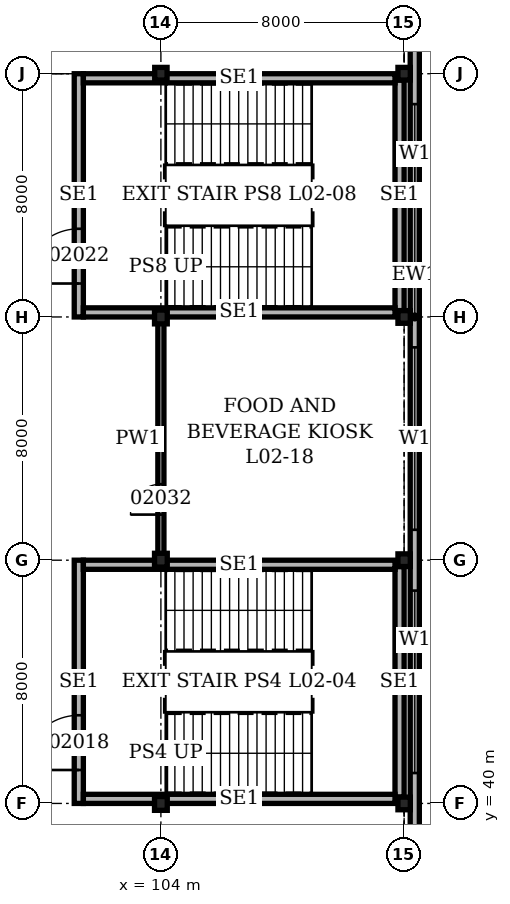
"""IFC4 building model, lengths in metres.
Left out: names, types, materials, properties, quantities, classifications, styles, units other than length and angle.
Written with IfcOpenShell. Run it as: python <this file> out.ifc"""

import sys

from ifc_helpers import new_model, si_unit, direction, frame, frame_2d, origin, origin_2d, place, context, subcontext, project, spatial, rectangle, i_section, extrude, element, fill, save


model = new_model("IFC4")
c1 = context("Model", 3, precision=1e-05, world=origin(), true_north=direction((0.0, 1.0)))
c2 = subcontext(c1, "Body", "Model", "MODEL_VIEW")
j1 = project(units=[si_unit("LENGTHUNIT", "METRE"), si_unit("PLANEANGLEUNIT", "RADIAN")], contexts=[c1])
p1 = place(None, origin())
s1 = spatial("IfcSite", under=j1, at=p1, CompositionType="ELEMENT")
p2 = place(p1, origin())
s2 = spatial("IfcBuilding", under=s1, at=p2, CompositionType="ELEMENT")
p3 = place(p2, frame((0.0, 0.0, 9.9)))
s3 = spatial("IfcBuildingStorey", under=s2, at=p3, CompositionType="ELEMENT", Elevation=9.9)
for number, where, z_axis, x_axis in (
    (1, (104.0, 40.0, 0.0), (0.0, 0.0, 1.0), (1.0, 0.0, 0.0)),
    (2, (104.0, 48.0, 0.0), (0.0, 0.0, 1.0), (1.0, 0.0, 0.0)),
    (3, (104.0, 56.0, 0.0), (0.0, 0.0, 1.0), (1.0, 0.0, 0.0)),
):
    element("IfcColumn", number, at=place(p3, frame(where, z_axis=z_axis, x_axis=x_axis)), inside=s3, PredefinedType="COLUMN", context=c2, shape_type="SweptSolid", body=[
        extrude(i_section(OverallWidth=0.419, OverallDepth=0.455, WebThickness=0.042, FlangeThickness=0.068, at=origin_2d()), origin(), (0.0, 0.0, 1.0), 5.0),
    ])
for number, where, z_axis, x_axis in (
    (4, (104.0, 64.0, 0.0), (0.0, 0.0, 1.0), (1.0, 0.0, 0.0)),
    (5, (112.0, 40.0, 0.0), (0.0, 0.0, 1.0), (1.0, 0.0, 0.0)),
    (6, (112.0, 48.0, 0.0), (0.0, 0.0, 1.0), (1.0, 0.0, 0.0)),
    (7, (112.0, 56.0, 0.0), (0.0, 0.0, 1.0), (1.0, 0.0, 0.0)),
    (8, (112.0, 64.0, 0.0), (0.0, 0.0, 1.0), (1.0, 0.0, 0.0)),
):
    element("IfcColumn", number, at=place(p3, frame(where, z_axis=z_axis, x_axis=x_axis)), inside=s3, PredefinedType="COLUMN", context=c2, shape_type="SweptSolid", body=[
        extrude(i_section(OverallWidth=0.406, OverallDepth=0.417, WebThickness=0.03, FlangeThickness=0.048, at=origin_2d()), origin(), (0.0, 0.0, 1.0), 5.0),
    ])
p4 = place(p3, frame((112.35, -0.35, 0.0), z_axis=(0.0, 0.0, 1.0), x_axis=(0.0, 1.0, 0.0)))
e9 = element("IfcWall", 9, at=p4, inside=s3, PredefinedType="SOLIDWALL", context=c2, shape_type="SweptSolid", body=[
    extrude(rectangle(XDim=112.7, YDim=0.3, at=frame_2d((56.35, 0.0))), origin(), (0.0, 0.0, 1.0), 5.0),
])
p5 = place(p4, frame((1.35, 0.0, 1.0)))
e10 = element("IfcOpeningElement", 10, at=p5, cuts=e9, PredefinedType="OPENING", context=c2, shape_type="SweptSolid", body=[
    extrude(rectangle(XDim=6.0, YDim=1.5, at=frame_2d((3.0, 0.75))), frame((0.0, 0.16, 0.0), z_axis=(0.0, -1.0, 0.0), x_axis=(1.0, 0.0, 0.0)), (0.0, 0.0, 1.0), 0.32),
])
p6 = place(p4, frame((9.35, 0.0, 1.0)))
e11 = element("IfcOpeningElement", 11, at=p6, cuts=e9, PredefinedType="OPENING", context=c2, shape_type="SweptSolid", body=[
    extrude(rectangle(XDim=6.0, YDim=1.5, at=frame_2d((3.0, 0.75))), frame((0.0, 0.16, 0.0), z_axis=(0.0, -1.0, 0.0), x_axis=(1.0, 0.0, 0.0)), (0.0, 0.0, 1.0), 0.32),
])
p7 = place(p4, frame((17.35, 0.0, 1.0)))
e12 = element("IfcOpeningElement", 12, at=p7, cuts=e9, PredefinedType="OPENING", context=c2, shape_type="SweptSolid", body=[
    extrude(rectangle(XDim=6.0, YDim=1.5, at=frame_2d((3.0, 0.75))), frame((0.0, 0.16, 0.0), z_axis=(0.0, -1.0, 0.0), x_axis=(1.0, 0.0, 0.0)), (0.0, 0.0, 1.0), 0.32),
])
p8 = place(p4, frame((25.35, 0.0, 1.0)))
e13 = element("IfcOpeningElement", 13, at=p8, cuts=e9, PredefinedType="OPENING", context=c2, shape_type="SweptSolid", body=[
    extrude(rectangle(XDim=6.0, YDim=1.5, at=frame_2d((3.0, 0.75))), frame((0.0, 0.16, 0.0), z_axis=(0.0, -1.0, 0.0), x_axis=(1.0, 0.0, 0.0)), (0.0, 0.0, 1.0), 0.32),
])
p9 = place(p4, frame((33.35, 0.0, 1.0)))
e14 = element("IfcOpeningElement", 14, at=p9, cuts=e9, PredefinedType="OPENING", context=c2, shape_type="SweptSolid", body=[
    extrude(rectangle(XDim=6.0, YDim=1.5, at=frame_2d((3.0, 0.75))), frame((0.0, 0.16, 0.0), z_axis=(0.0, -1.0, 0.0), x_axis=(1.0, 0.0, 0.0)), (0.0, 0.0, 1.0), 0.32),
])
p10 = place(p4, frame((41.35, 0.0, 1.0)))
e15 = element("IfcOpeningElement", 15, at=p10, cuts=e9, PredefinedType="OPENING", context=c2, shape_type="SweptSolid", body=[
    extrude(rectangle(XDim=6.0, YDim=1.5, at=frame_2d((3.0, 0.75))), frame((0.0, 0.16, 0.0), z_axis=(0.0, -1.0, 0.0), x_axis=(1.0, 0.0, 0.0)), (0.0, 0.0, 1.0), 0.32),
])
p11 = place(p4, frame((49.35, 0.0, 1.0)))
e16 = element("IfcOpeningElement", 16, at=p11, cuts=e9, PredefinedType="OPENING", context=c2, shape_type="SweptSolid", body=[
    extrude(rectangle(XDim=6.0, YDim=1.5, at=frame_2d((3.0, 0.75))), frame((0.0, 0.16, 0.0), z_axis=(0.0, -1.0, 0.0), x_axis=(1.0, 0.0, 0.0)), (0.0, 0.0, 1.0), 0.32),
])
p12 = place(p4, frame((57.35, 0.0, 1.0)))
e17 = element("IfcOpeningElement", 17, at=p12, cuts=e9, PredefinedType="OPENING", context=c2, shape_type="SweptSolid", body=[
    extrude(rectangle(XDim=6.0, YDim=1.5, at=frame_2d((3.0, 0.75))), frame((0.0, 0.16, 0.0), z_axis=(0.0, -1.0, 0.0), x_axis=(1.0, 0.0, 0.0)), (0.0, 0.0, 1.0), 0.32),
])
p13 = place(p4, frame((65.35, 0.0, 1.0)))
e18 = element("IfcOpeningElement", 18, at=p13, cuts=e9, PredefinedType="OPENING", context=c2, shape_type="SweptSolid", body=[
    extrude(rectangle(XDim=6.0, YDim=1.5, at=frame_2d((3.0, 0.75))), frame((0.0, 0.16, 0.0), z_axis=(0.0, -1.0, 0.0), x_axis=(1.0, 0.0, 0.0)), (0.0, 0.0, 1.0), 0.32),
])
p14 = place(p4, frame((73.35, 0.0, 1.0)))
e19 = element("IfcOpeningElement", 19, at=p14, cuts=e9, PredefinedType="OPENING", context=c2, shape_type="SweptSolid", body=[
    extrude(rectangle(XDim=6.0, YDim=1.5, at=frame_2d((3.0, 0.75))), frame((0.0, 0.16, 0.0), z_axis=(0.0, -1.0, 0.0), x_axis=(1.0, 0.0, 0.0)), (0.0, 0.0, 1.0), 0.32),
])
p15 = place(p4, frame((81.35, 0.0, 1.0)))
e20 = element("IfcOpeningElement", 20, at=p15, cuts=e9, PredefinedType="OPENING", context=c2, shape_type="SweptSolid", body=[
    extrude(rectangle(XDim=6.0, YDim=1.5, at=frame_2d((3.0, 0.75))), frame((0.0, 0.16, 0.0), z_axis=(0.0, -1.0, 0.0), x_axis=(1.0, 0.0, 0.0)), (0.0, 0.0, 1.0), 0.32),
])
p16 = place(p4, frame((89.35, 0.0, 1.0)))
e21 = element("IfcOpeningElement", 21, at=p16, cuts=e9, PredefinedType="OPENING", context=c2, shape_type="SweptSolid", body=[
    extrude(rectangle(XDim=6.0, YDim=1.5, at=frame_2d((3.0, 0.75))), frame((0.0, 0.16, 0.0), z_axis=(0.0, -1.0, 0.0), x_axis=(1.0, 0.0, 0.0)), (0.0, 0.0, 1.0), 0.32),
])
p17 = place(p4, frame((97.35, 0.0, 1.0)))
e22 = element("IfcOpeningElement", 22, at=p17, cuts=e9, PredefinedType="OPENING", context=c2, shape_type="SweptSolid", body=[
    extrude(rectangle(XDim=6.0, YDim=1.5, at=frame_2d((3.0, 0.75))), frame((0.0, 0.16, 0.0), z_axis=(0.0, -1.0, 0.0), x_axis=(1.0, 0.0, 0.0)), (0.0, 0.0, 1.0), 0.32),
])
p18 = place(p4, frame((105.35, 0.0, 1.0)))
e23 = element("IfcOpeningElement", 23, at=p18, cuts=e9, PredefinedType="OPENING", context=c2, shape_type="SweptSolid", body=[
    extrude(rectangle(XDim=6.0, YDim=1.5, at=frame_2d((3.0, 0.75))), frame((0.0, 0.16, 0.0), z_axis=(0.0, -1.0, 0.0), x_axis=(1.0, 0.0, 0.0)), (0.0, 0.0, 1.0), 0.32),
])
p19 = place(p3, frame((101.3, 40.0, 0.0), z_axis=(0.0, 0.0, 1.0), x_axis=(0.0, 1.0, 0.0)))
e24 = element("IfcWall", 24, at=p19, inside=s3, PredefinedType="SOLIDWALL", context=c2, shape_type="SweptSolid", body=[
    extrude(rectangle(XDim=8.0, YDim=0.3, at=frame_2d((4.0, 0.0))), origin(), (0.0, 0.0, 1.0), 4.8),
])
p20 = place(p19, frame((1.1, 0.0, 0.0)))
e25 = element("IfcOpeningElement", 25, at=p20, cuts=e24, PredefinedType="OPENING", context=c2, shape_type="SweptSolid", body=[
    extrude(rectangle(XDim=1.8, YDim=2.1, at=frame_2d((0.9, 1.05))), frame((0.0, 0.16, 0.0), z_axis=(0.0, -1.0, 0.0), x_axis=(1.0, 0.0, 0.0)), (0.0, 0.0, 1.0), 0.32),
])
p21 = place(p3, frame((111.85, 40.208, 0.0), z_axis=(0.0, 0.0, 1.0), x_axis=(0.0, 1.0, 0.0)))
e26 = element("IfcWall", 26, at=p21, inside=s3, PredefinedType="SOLIDWALL", context=c2, shape_type="SweptSolid", body=[
    extrude(rectangle(XDim=7.583, YDim=0.3, at=frame_2d((3.792, 0.0))), origin(), (0.0, 0.0, 1.0), 4.8),
])
for number, where, z_axis, x_axis in (
    (27, (101.45, 40.15, 0.0), (0.0, 0.0, 1.0), (1.0, 0.0, 0.0)),
    (28, (101.45, 47.85, 0.0), (0.0, 0.0, 1.0), (1.0, 0.0, 0.0)),
):
    element("IfcWall", number, at=place(p3, frame(where, z_axis=z_axis, x_axis=x_axis)), inside=s3, PredefinedType="SOLIDWALL", context=c2, shape_type="SweptSolid", body=[
        extrude(rectangle(XDim=10.25, YDim=0.3, at=frame_2d((5.125, 0.0))), origin(), (0.0, 0.0, 1.0), 4.8),
    ])
p22 = place(p3, frame((101.3, 56.0, 0.0), z_axis=(0.0, 0.0, 1.0), x_axis=(0.0, 1.0, 0.0)))
e29 = element("IfcWall", 29, at=p22, inside=s3, PredefinedType="SOLIDWALL", context=c2, shape_type="SweptSolid", body=[
    extrude(rectangle(XDim=8.0, YDim=0.3, at=frame_2d((4.0, 0.0))), origin(), (0.0, 0.0, 1.0), 4.8),
])
p23 = place(p22, frame((1.1, 0.0, 0.0)))
e30 = element("IfcOpeningElement", 30, at=p23, cuts=e29, PredefinedType="OPENING", context=c2, shape_type="SweptSolid", body=[
    extrude(rectangle(XDim=1.8, YDim=2.1, at=frame_2d((0.9, 1.05))), frame((0.0, 0.16, 0.0), z_axis=(0.0, -1.0, 0.0), x_axis=(1.0, 0.0, 0.0)), (0.0, 0.0, 1.0), 0.32),
])
p24 = place(p3, frame((111.85, 56.208, 0.0), z_axis=(0.0, 0.0, 1.0), x_axis=(0.0, 1.0, 0.0)))
e31 = element("IfcWall", 31, at=p24, inside=s3, PredefinedType="SOLIDWALL", context=c2, shape_type="SweptSolid", body=[
    extrude(rectangle(XDim=7.583, YDim=0.3, at=frame_2d((3.792, 0.0))), origin(), (0.0, 0.0, 1.0), 4.8),
])
for number, where, z_axis, x_axis in (
    (32, (101.45, 56.15, 0.0), (0.0, 0.0, 1.0), (1.0, 0.0, 0.0)),
    (33, (101.45, 63.85, 0.0), (0.0, 0.0, 1.0), (1.0, 0.0, 0.0)),
):
    element("IfcWall", number, at=place(p3, frame(where, z_axis=z_axis, x_axis=x_axis)), inside=s3, PredefinedType="SOLIDWALL", context=c2, shape_type="SweptSolid", body=[
        extrude(rectangle(XDim=10.25, YDim=0.3, at=frame_2d((5.125, 0.0))), origin(), (0.0, 0.0, 1.0), 4.8),
    ])
p25 = place(p3, frame((104.0, 48.1, 0.0), z_axis=(0.0, 0.0, 1.0), x_axis=(0.0, 1.0, 0.0)))
e34 = element("IfcWall", 34, at=p25, inside=s3, PredefinedType="PARTITIONING", context=c2, shape_type="SweptSolid", body=[
    extrude(rectangle(XDim=7.8, YDim=0.2, at=frame_2d((3.9, 0.0))), origin(), (0.0, 0.0, 1.0), 4.028),
])
p26 = place(p25, frame((1.4, 0.0, 0.0)))
e35 = element("IfcOpeningElement", 35, at=p26, cuts=e34, PredefinedType="OPENING", context=c2, shape_type="SweptSolid", body=[
    extrude(rectangle(XDim=1.0, YDim=2.1, at=frame_2d((0.5, 1.05))), frame((0.0, 0.11, 0.0), z_axis=(0.0, -1.0, 0.0), x_axis=(1.0, 0.0, 0.0)), (0.0, 0.0, 1.0), 0.22),
])
p27 = place(p10, origin())
e36 = element("IfcWindow", 36, at=p27, inside=s3, PartitioningType="SINGLE_PANEL", PredefinedType="WINDOW", context=c2, shape_type="SweptSolid", body=[
    extrude(rectangle(XDim=6.0, YDim=1.5, at=frame_2d((3.0, 0.75))), frame((0.0, 0.03, 0.0), z_axis=(0.0, -1.0, 0.0), x_axis=(1.0, 0.0, 0.0)), (0.0, 0.0, 1.0), 0.06),
])
fill(e15, e36)
p28 = place(p11, origin())
e37 = element("IfcWindow", 37, at=p28, inside=s3, PartitioningType="SINGLE_PANEL", PredefinedType="WINDOW", context=c2, shape_type="SweptSolid", body=[
    extrude(rectangle(XDim=6.0, YDim=1.5, at=frame_2d((3.0, 0.75))), frame((0.0, 0.03, 0.0), z_axis=(0.0, -1.0, 0.0), x_axis=(1.0, 0.0, 0.0)), (0.0, 0.0, 1.0), 0.06),
])
fill(e16, e37)
p29 = place(p12, origin())
e38 = element("IfcWindow", 38, at=p29, inside=s3, PartitioningType="SINGLE_PANEL", PredefinedType="WINDOW", context=c2, shape_type="SweptSolid", body=[
    extrude(rectangle(XDim=6.0, YDim=1.5, at=frame_2d((3.0, 0.75))), frame((0.0, 0.03, 0.0), z_axis=(0.0, -1.0, 0.0), x_axis=(1.0, 0.0, 0.0)), (0.0, 0.0, 1.0), 0.06),
])
fill(e17, e38)
p30 = place(p20, origin())
e39 = element("IfcDoor", 39, at=p30, inside=s3, OperationType="DOUBLE_DOOR_SINGLE_SWING", PredefinedType="DOOR", context=c2, shape_type="SweptSolid", body=[
    extrude(rectangle(XDim=1.8, YDim=2.1, at=frame_2d((0.9, 1.05))), frame((0.0, 0.15, 0.0), z_axis=(0.0, -1.0, 0.0), x_axis=(1.0, 0.0, 0.0)), (0.0, 0.0, 1.0), 0.3),
])
fill(e25, e39)
p31 = place(p23, origin())
e40 = element("IfcDoor", 40, at=p31, inside=s3, OperationType="DOUBLE_DOOR_SINGLE_SWING", PredefinedType="DOOR", context=c2, shape_type="SweptSolid", body=[
    extrude(rectangle(XDim=1.8, YDim=2.1, at=frame_2d((0.9, 1.05))), frame((0.0, 0.15, 0.0), z_axis=(0.0, -1.0, 0.0), x_axis=(1.0, 0.0, 0.0)), (0.0, 0.0, 1.0), 0.3),
])
fill(e30, e40)
p32 = place(p26, origin())
e41 = element("IfcDoor", 41, at=p32, inside=s3, OperationType="SINGLE_SWING_LEFT", PredefinedType="DOOR", context=c2, shape_type="SweptSolid", body=[
    extrude(rectangle(XDim=1.0, YDim=2.1, at=frame_2d((0.5, 1.05))), frame((0.0, 0.1, 0.0), z_axis=(0.0, -1.0, 0.0), x_axis=(1.0, 0.0, 0.0)), (0.0, 0.0, 1.0), 0.199),
])
fill(e35, e41)
save(model, sys.argv[1])
